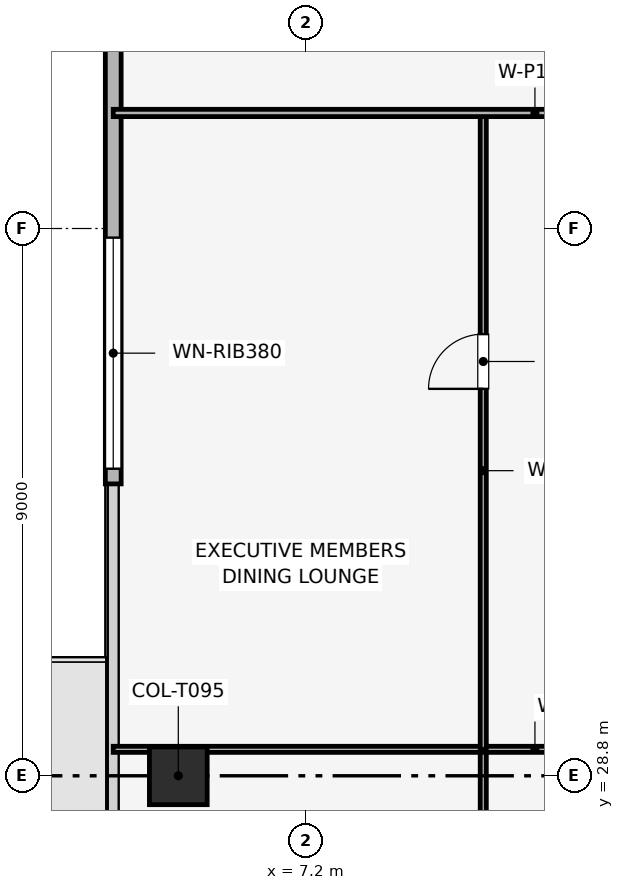
"""IFC4 building model, lengths in metres.
Left out: names, types, materials, properties, quantities, classifications, styles, units other than length and angle.
Written with IfcOpenShell. Run it as: python <this file> out.ifc"""

import sys

from ifc_helpers import new_model, si_unit, direction, frame, frame_2d, origin, origin_2d, place, context, subcontext, project, spatial, rectangle, extrude, element, fill, save


model = new_model("IFC4")
c1 = context("Model", 3, precision=1e-05, world=origin(), true_north=direction((0.0, 1.0)))
c2 = subcontext(c1, "Body", "Model", "MODEL_VIEW")
j1 = project(units=[si_unit("LENGTHUNIT", "METRE"), si_unit("PLANEANGLEUNIT", "RADIAN")], contexts=[c1])
p1 = place(None, origin())
s1 = spatial("IfcSite", under=j1, at=p1, CompositionType="ELEMENT")
p2 = place(p1, origin())
s2 = spatial("IfcBuilding", under=s1, at=p2, CompositionType="ELEMENT")
p3 = place(p2, frame((0.0, 0.0, 272.85)))
s3 = spatial("IfcBuildingStorey", under=s2, at=p3, CompositionType="ELEMENT", Elevation=272.85)
p4 = place(p3, frame((5.1, 28.8, 0.003), z_axis=(0.0, 0.0, 1.0), x_axis=(1.0, 0.0, 0.0)))
e1 = element("IfcColumn", 1, at=p4, inside=s3, PredefinedType="COLUMN", context=c2, shape_type="SweptSolid", body=[
    extrude(rectangle(XDim=0.95, YDim=0.95, at=origin_2d()), origin(), (0.0, 0.0, 1.0), 3.494),
])
p5 = place(p3, frame((4.03, 33.6, 0.0), z_axis=(0.0, 0.0, 1.0), x_axis=(0.0, 1.0, 0.0)))
e2 = element("IfcWall", 2, at=p5, inside=s3, PredefinedType="SOLIDWALL", context=c2, shape_type="SweptSolid", body=[
    extrude(rectangle(XDim=13.2, YDim=0.26, at=frame_2d((6.6, 0.0))), origin(), (0.0, 0.0, 1.0), 3.5),
])
p6 = place(p5, frame((0.25, 0.0, 0.9)))
e3 = element("IfcOpeningElement", 3, at=p6, cuts=e2, PredefinedType="OPENING", context=c2, shape_type="SweptSolid", body=[
    extrude(rectangle(XDim=3.8, YDim=1.9, at=frame_2d((1.9, 0.95))), frame((0.0, 0.14, 0.0), z_axis=(0.0, -1.0, 0.0), x_axis=(1.0, 0.0, 0.0)), (0.0, 0.0, 1.0), 0.28),
])
p7 = place(p3, frame((10.115, 21.304, 0.0), z_axis=(0.0, 0.0, 1.0), x_axis=(0.0, 1.0, 0.0)))
e4 = element("IfcWall", 4, at=p7, inside=s3, PredefinedType="MOVABLE", context=c2, shape_type="SweptSolid", body=[
    extrude(rectangle(XDim=7.931, YDim=0.1, at=frame_2d((3.966, 0.0))), origin(), (0.0, 0.0, 1.0), 3.085),
])
p8 = place(p7, frame((0.2, 0.0, 0.0)))
e5 = element("IfcOpeningElement", 5, at=p8, cuts=e4, PredefinedType="OPENING", context=c2, shape_type="SweptSolid", body=[
    extrude(rectangle(XDim=0.9, YDim=2.1, at=frame_2d((0.45, 1.05))), frame((0.0, 0.06, 0.0), z_axis=(0.0, -1.0, 0.0), x_axis=(1.0, 0.0, 0.0)), (0.0, 0.0, 1.0), 0.12),
])
p9 = place(p3, frame((4.03, 29.235, 0.0), z_axis=(0.0, 0.0, 1.0), x_axis=(1.0, 0.0, 0.0)))
e6 = element("IfcWall", 6, at=p9, inside=s3, PredefinedType="MOVABLE", context=c2, shape_type="SweptSolid", body=[
    extrude(rectangle(XDim=13.87, YDim=0.1, at=frame_2d((6.935, 0.0))), origin(), (0.0, 0.0, 1.0), 3.085),
])
p10 = place(p3, frame((10.115, 29.235, 0.0), z_axis=(0.0, 0.0, 1.0), x_axis=(0.0, 1.0, 0.0)))
e7 = element("IfcWall", 7, at=p10, inside=s3, PredefinedType="MOVABLE", context=c2, shape_type="SweptSolid", body=[
    extrude(rectangle(XDim=10.465, YDim=0.1, at=frame_2d((5.232, 0.0))), origin(), (0.0, 0.0, 1.0), 3.085),
])
p11 = place(p10, frame((5.928, 0.0, 0.0)))
e8 = element("IfcOpeningElement", 8, at=p11, cuts=e7, PredefinedType="OPENING", context=c2, shape_type="SweptSolid", body=[
    extrude(rectangle(XDim=0.9, YDim=2.1, at=frame_2d((0.45, 1.05))), frame((0.0, 0.06, 0.0), z_axis=(0.0, -1.0, 0.0), x_axis=(1.0, 0.0, 0.0)), (0.0, 0.0, 1.0), 0.12),
])
p12 = place(p3, frame((4.03, 39.7, 0.0), z_axis=(0.0, 0.0, 1.0), x_axis=(1.0, 0.0, 0.0)))
e9 = element("IfcWall", 9, at=p12, inside=s3, PredefinedType="PARTITIONING", context=c2, shape_type="SweptSolid", body=[
    extrude(rectangle(XDim=13.87, YDim=0.12, at=frame_2d((6.935, 0.0))), origin(), (0.0, 0.0, 1.0), 3.085),
])
p13 = place(p6, origin())
e10 = element("IfcWindow", 10, at=p13, inside=s3, PartitioningType="SINGLE_PANEL", PredefinedType="WINDOW", context=c2, shape_type="SweptSolid", body=[
    extrude(rectangle(XDim=3.8, YDim=1.9, at=frame_2d((1.9, 0.95))), frame((0.0, 0.03, 0.0), z_axis=(0.0, -1.0, 0.0), x_axis=(1.0, 0.0, 0.0)), (0.0, 0.0, 1.0), 0.06),
])
fill(e3, e10)
p14 = place(p11, origin())
e11 = element("IfcDoor", 11, at=p14, inside=s3, OperationType="SINGLE_SWING_LEFT", PredefinedType="DOOR", context=c2, shape_type="SweptSolid", body=[
    extrude(rectangle(XDim=0.9, YDim=2.1, at=frame_2d((0.45, 1.05))), frame((0.0, 0.025, 0.0), z_axis=(0.0, -1.0, 0.0), x_axis=(1.0, 0.0, 0.0)), (0.0, 0.0, 1.0), 0.05),
])
fill(e8, e11)
save(model, sys.argv[1])
